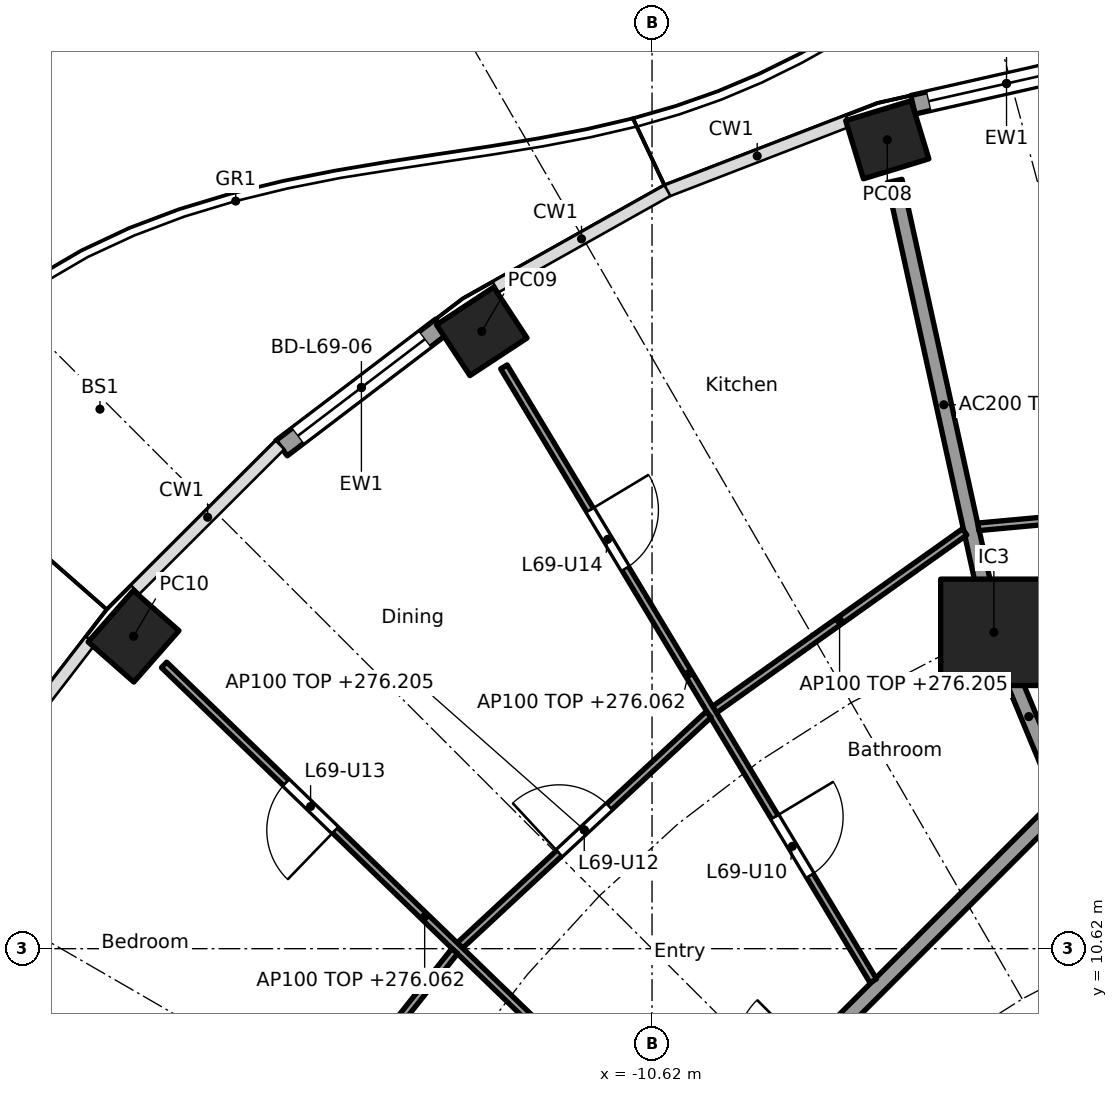
"""IFC4 building model, lengths in metres.
Left out: names, types, materials, properties, quantities, classifications, styles, units other than length and angle.
Written with IfcOpenShell. Run it as: python <this file> out.ifc"""

import sys

from ifc_helpers import new_model, si_unit, direction, frame, frame_2d, origin, origin_2d, place, context, subcontext, project, spatial, rectangle, hollow_rectangle, extrude, element, fill, save


model = new_model("IFC4")
c1 = context("Model", 3, precision=1e-05, world=origin(), true_north=direction((0.0, 1.0)))
c2 = subcontext(c1, "Body", "Model", "MODEL_VIEW")
j1 = project(units=[si_unit("LENGTHUNIT", "METRE"), si_unit("PLANEANGLEUNIT", "RADIAN")], contexts=[c1])
p1 = place(None, origin())
s1 = spatial("IfcSite", under=j1, at=p1, CompositionType="ELEMENT")
p2 = place(p1, origin())
s2 = spatial("IfcBuilding", under=s1, at=p2, CompositionType="ELEMENT")
p3 = place(p2, frame((0.0, 0.0, 273.3)))
s3 = spatial("IfcBuildingStorey", under=s2, at=p3, CompositionType="ELEMENT", Elevation=273.3)
for number, where, z_axis, x_axis in (
    (1, (-7.525, 21.262, 0.0), (0.0, 0.0, 1.0), (-0.957, -0.292, 0.0)),
    (2, (-12.86, 18.741, 0.0), (0.0, 0.0, 1.0), (-0.836, -0.549, 0.0)),
    (3, (-17.441, 14.73, 0.0), (0.0, 0.0, 1.0), (-0.66, -0.751, 0.0)),
):
    element("IfcColumn", number, at=place(p3, frame(where, z_axis=z_axis, x_axis=x_axis)), inside=s3, PredefinedType="COLUMN", context=c2, shape_type="SweptSolid", body=[
        extrude(hollow_rectangle(XDim=0.9, YDim=0.8, WallThickness=0.028, at=origin_2d()), origin(), (0.0, 0.0, 1.0), 3.7),
    ])
p4 = place(p3, frame((-6.123, 14.782, 0.0), z_axis=(0.0, 0.0, 1.0), x_axis=(1.0, 0.0, 0.0)))
e4 = element("IfcColumn", 4, at=p4, inside=s3, PredefinedType="COLUMN", context=c2, shape_type="SweptSolid", body=[
    extrude(rectangle(XDim=1.4, YDim=1.4, at=origin_2d()), origin(), (0.0, 0.0, 1.0), 3.7),
])
p5 = place(p3, frame((-7.188, 21.723, 0.0), z_axis=(0.0, 0.0, 1.0), x_axis=(0.975319584032, 0.220797891756, 0.0)))
e5 = element("IfcWall", 5, at=p5, inside=s3, PredefinedType="SOLIDWALL", context=c2, shape_type="SweptSolid", body=[
    extrude(rectangle(XDim=2.525, YDim=0.25, at=frame_2d((1.263, 0.0))), origin(), (0.0, 0.0, 1.0), 3.44),
])
p6 = place(p5, frame((0.213, 0.0, 0.0)))
e6 = element("IfcOpeningElement", 6, at=p6, cuts=e5, PredefinedType="OPENING", context=c2, shape_type="SweptSolid", body=[
    extrude(rectangle(XDim=2.1, YDim=2.4, at=frame_2d((1.05, 1.2))), frame((0.0, 0.135, 0.0), z_axis=(0.0, -1.0, 0.0), x_axis=(1.0, 0.0, 0.0)), (0.0, 0.0, 1.0), 0.27),
])
p7 = place(p3, frame((-15.495, 17.204, 0.0), z_axis=(0.0, 0.0, 1.0), x_axis=(0.796010739377, 0.605282498339, 0.0)))
e7 = element("IfcWall", 7, at=p7, inside=s3, PredefinedType="SOLIDWALL", context=c2, shape_type="SweptSolid", body=[
    extrude(rectangle(XDim=2.641, YDim=0.25, at=frame_2d((1.32, 0.0))), origin(), (0.0, 0.0, 1.0), 3.44),
])
p8 = place(p7, frame((0.27, 0.0, 0.0)))
e8 = element("IfcOpeningElement", 8, at=p8, cuts=e7, PredefinedType="OPENING", context=c2, shape_type="SweptSolid", body=[
    extrude(rectangle(XDim=2.1, YDim=2.4, at=frame_2d((1.05, 1.2))), frame((0.0, 0.135, 0.0), z_axis=(0.0, -1.0, 0.0), x_axis=(1.0, 0.0, 0.0)), (0.0, 0.0, 1.0), 0.27),
])
p9 = place(p3, frame((-4.613, 9.988, 0.0), z_axis=(0.0, 0.0, 1.0), x_axis=(-0.707106781187, -0.707106781187, 0.0)))
e9 = element("IfcWall", 9, at=p9, inside=s3, PredefinedType="SHEAR", context=c2, shape_type="SweptSolid", body=[
    extrude(rectangle(XDim=7.602, YDim=0.6, at=frame_2d((3.801, 0.0))), origin(), (0.0, 0.0, 1.0), 3.44),
])
p10 = place(p9, frame((0.351, 0.0, 0.0)))
e10 = element("IfcOpeningElement", 10, at=p10, cuts=e9, PredefinedType="OPENING", context=c2, shape_type="SweptSolid", body=[
    extrude(rectangle(XDim=1.1, YDim=2.1, at=frame_2d((0.55, 1.05))), frame((0.0, 0.31, 0.0), z_axis=(0.0, -1.0, 0.0), x_axis=(1.0, 0.0, 0.0)), (0.0, 0.0, 1.0), 0.62),
])
p11 = place(p3, frame((-5.243, 12.657, 0.0), z_axis=(0.0, 0.0, 1.0), x_axis=(-0.38273085373, 0.923859888513, 0.0)))
e11 = element("IfcWall", 11, at=p11, inside=s3, PredefinedType="PARTITIONING", context=c2, shape_type="SweptSolid", body=[
    extrude(rectangle(XDim=2.199, YDim=0.2, at=frame_2d((1.1, 0.0))), origin(), (0.0, 0.0, 1.0), 3.44),
])
p12 = place(p3, frame((-6.134, 14.831, 0.0), z_axis=(0.0, 0.0, 1.0), x_axis=(-0.214842475666, 0.976648714047, 0.0)))
e12 = element("IfcWall", 12, at=p12, inside=s3, PredefinedType="PARTITIONING", context=c2, shape_type="SweptSolid", body=[
    extrude(rectangle(XDim=6.031, YDim=0.2, at=frame_2d((3.015, 0.0))), origin(), (0.0, 0.0, 1.0), 2.905),
])
p13 = place(p3, frame((-5.275, 12.494, 0.0), z_axis=(0.0, 0.0, 1.0), x_axis=(-0.707106781187, -0.707106781187, 0.0)))
e13 = element("IfcWall", 13, at=p13, inside=s3, PredefinedType="PARTITIONING", context=c2, shape_type="SweptSolid", body=[
    extrude(rectangle(XDim=10.209, YDim=0.2, at=frame_2d((5.104, 0.0))), origin(), (0.0, 0.0, 1.0), 3.44),
])
p14 = place(p13, frame((4.604, 0.0, 0.0)))
e14 = element("IfcOpeningElement", 14, at=p14, cuts=e13, PredefinedType="OPENING", context=c2, shape_type="SweptSolid", body=[
    extrude(rectangle(XDim=1.0, YDim=2.1, at=frame_2d((0.5, 1.05))), frame((0.0, 0.11, 0.0), z_axis=(0.0, -1.0, 0.0), x_axis=(1.0, 0.0, 0.0)), (0.0, 0.0, 1.0), 0.22),
])
p15 = place(p3, frame((-1.811, 16.583, 0.0), z_axis=(0.0, 0.0, 1.0), x_axis=(-0.995842301034, -0.091093970555, 0.0)))
e15 = element("IfcWall", 15, at=p15, inside=s3, PredefinedType="PARTITIONING", context=c2, shape_type="SweptSolid", body=[
    extrude(rectangle(XDim=4.535, YDim=0.1, at=frame_2d((2.267, 0.0))), origin(), (0.0, 0.0, 1.0), 2.905),
])
p16 = place(p3, frame((-6.508, 16.103, 0.0), z_axis=(0.0, 0.0, 1.0), x_axis=(-0.815202203556, -0.579176456114, 0.0)))
e16 = element("IfcWall", 16, at=p16, inside=s3, PredefinedType="PARTITIONING", context=c2, shape_type="SweptSolid", body=[
    extrude(rectangle(XDim=4.036, YDim=0.1, at=frame_2d((2.018, 0.0))), origin(), (0.0, 0.0, 1.0), 2.905),
])
p17 = place(p3, frame((-7.709, 10.197, 0.0), z_axis=(0.0, 0.0, 1.0), x_axis=(-0.515516160663, 0.856879856278, 0.0)))
e17 = element("IfcWall", 17, at=p17, inside=s3, PredefinedType="PARTITIONING", context=c2, shape_type="SweptSolid", body=[
    extrude(rectangle(XDim=9.426, YDim=0.1, at=frame_2d((4.713, 0.0))), origin(), (0.0, 0.0, 1.0), 2.762),
])
p18 = place(p17, frame((1.615, 0.0, 0.0)))
e18 = element("IfcOpeningElement", 18, at=p18, cuts=e17, PredefinedType="OPENING", context=c2, shape_type="SweptSolid", body=[
    extrude(rectangle(XDim=0.9, YDim=2.1, at=frame_2d((0.45, 1.05))), frame((0.0, 0.06, 0.0), z_axis=(0.0, -1.0, 0.0), x_axis=(1.0, 0.0, 0.0)), (0.0, 0.0, 1.0), 0.12),
])
p19 = place(p17, frame((6.328, 0.0, 0.0)))
e19 = element("IfcOpeningElement", 19, at=p19, cuts=e17, PredefinedType="OPENING", context=c2, shape_type="SweptSolid", body=[
    extrude(rectangle(XDim=0.9, YDim=2.1, at=frame_2d((0.45, 1.05))), frame((0.0, 0.06, 0.0), z_axis=(0.0, -1.0, 0.0), x_axis=(1.0, 0.0, 0.0)), (0.0, 0.0, 1.0), 0.12),
])
p20 = place(p3, frame((-9.875, 13.702, 0.0), z_axis=(0.0, 0.0, 1.0), x_axis=(-0.732618266441, -0.680639754699, 0.0)))
e20 = element("IfcWall", 20, at=p20, inside=s3, PredefinedType="PARTITIONING", context=c2, shape_type="SweptSolid", body=[
    extrude(rectangle(XDim=4.467, YDim=0.1, at=frame_2d((2.233, 0.0))), origin(), (0.0, 0.0, 1.0), 2.905),
])
p21 = place(p20, frame((1.783, 0.0, 0.0)))
e21 = element("IfcOpeningElement", 21, at=p21, cuts=e20, PredefinedType="OPENING", context=c2, shape_type="SweptSolid", body=[
    extrude(rectangle(XDim=0.9, YDim=2.1, at=frame_2d((0.45, 1.05))), frame((0.0, 0.06, 0.0), z_axis=(0.0, -1.0, 0.0), x_axis=(1.0, 0.0, 0.0)), (0.0, 0.0, 1.0), 0.12),
])
p22 = place(p3, frame((-10.183, 7.727, 0.0), z_axis=(0.0, 0.0, 1.0), x_axis=(-0.719063433856, 0.694944442449, 0.0)))
e22 = element("IfcWall", 22, at=p22, inside=s3, PredefinedType="PARTITIONING", context=c2, shape_type="SweptSolid", body=[
    extrude(rectangle(XDim=9.535, YDim=0.1, at=frame_2d((4.768, 0.0))), origin(), (0.0, 0.0, 1.0), 2.762),
])
p23 = place(p22, frame((1.637, 0.0, 0.0)))
e23 = element("IfcOpeningElement", 23, at=p23, cuts=e22, PredefinedType="OPENING", context=c2, shape_type="SweptSolid", body=[
    extrude(rectangle(XDim=0.9, YDim=2.1, at=frame_2d((0.45, 1.05))), frame((0.0, 0.06, 0.0), z_axis=(0.0, -1.0, 0.0), x_axis=(1.0, 0.0, 0.0)), (0.0, 0.0, 1.0), 0.12),
])
p24 = place(p22, frame((6.405, 0.0, 0.0)))
e24 = element("IfcOpeningElement", 24, at=p24, cuts=e22, PredefinedType="OPENING", context=c2, shape_type="SweptSolid", body=[
    extrude(rectangle(XDim=0.9, YDim=2.1, at=frame_2d((0.45, 1.05))), frame((0.0, 0.06, 0.0), z_axis=(0.0, -1.0, 0.0), x_axis=(1.0, 0.0, 0.0)), (0.0, 0.0, 1.0), 0.12),
])
p25 = place(p3, frame((-13.216, 10.589, 0.0), z_axis=(0.0, 0.0, 1.0), x_axis=(-0.622251572882, -0.782817335045, 0.0)))
e25 = element("IfcWall", 25, at=p25, inside=s3, PredefinedType="PARTITIONING", context=c2, shape_type="SweptSolid", body=[
    extrude(rectangle(XDim=4.636, YDim=0.1, at=frame_2d((2.318, 0.0))), origin(), (0.0, 0.0, 1.0), 2.905),
])
p26 = place(p6, origin())
e26 = element("IfcDoor", 26, at=p26, inside=s3, OperationType="SLIDING_TO_LEFT", PredefinedType="DOOR", context=c2, shape_type="SweptSolid", body=[
    extrude(rectangle(XDim=2.1, YDim=2.4, at=frame_2d((1.05, 1.2))), frame((0.0, 0.025, 0.0), z_axis=(0.0, -1.0, 0.0), x_axis=(1.0, 0.0, 0.0)), (0.0, 0.0, 1.0), 0.05),
])
fill(e6, e26)
p27 = place(p8, origin())
e27 = element("IfcDoor", 27, at=p27, inside=s3, OperationType="SLIDING_TO_LEFT", PredefinedType="DOOR", context=c2, shape_type="SweptSolid", body=[
    extrude(rectangle(XDim=2.1, YDim=2.4, at=frame_2d((1.05, 1.2))), frame((0.0, 0.025, 0.0), z_axis=(0.0, -1.0, 0.0), x_axis=(1.0, 0.0, 0.0)), (0.0, 0.0, 1.0), 0.05),
])
fill(e8, e27)
p28 = place(p18, frame((0.9, 0.0, 0.0), x_axis=(-1.0, 0.0, 0.0)))
e28 = element("IfcDoor", 28, at=p28, inside=s3, OperationType="SINGLE_SWING_LEFT", PredefinedType="DOOR", context=c2, shape_type="SweptSolid", body=[
    extrude(rectangle(XDim=0.9, YDim=2.1, at=frame_2d((0.45, 1.05))), frame((0.0, 0.025, 0.0), z_axis=(0.0, -1.0, 0.0), x_axis=(1.0, 0.0, 0.0)), (0.0, 0.0, 1.0), 0.05),
])
fill(e18, e28)
p29 = place(p21, frame((0.9, 0.0, 0.0), x_axis=(-1.0, 0.0, 0.0)))
e29 = element("IfcDoor", 29, at=p29, inside=s3, OperationType="SINGLE_SWING_LEFT", PredefinedType="DOOR", context=c2, shape_type="SweptSolid", body=[
    extrude(rectangle(XDim=0.9, YDim=2.1, at=frame_2d((0.45, 1.05))), frame((0.0, 0.025, 0.0), z_axis=(0.0, -1.0, 0.0), x_axis=(1.0, 0.0, 0.0)), (0.0, 0.0, 1.0), 0.05),
])
fill(e21, e29)
p30 = place(p24, origin())
e30 = element("IfcDoor", 30, at=p30, inside=s3, OperationType="SINGLE_SWING_LEFT", PredefinedType="DOOR", context=c2, shape_type="SweptSolid", body=[
    extrude(rectangle(XDim=0.9, YDim=2.1, at=frame_2d((0.45, 1.05))), frame((0.0, 0.025, 0.0), z_axis=(0.0, -1.0, 0.0), x_axis=(1.0, 0.0, 0.0)), (0.0, 0.0, 1.0), 0.05),
])
fill(e24, e30)
p31 = place(p19, frame((0.9, 0.0, 0.0), x_axis=(-1.0, 0.0, 0.0)))
e31 = element("IfcDoor", 31, at=p31, inside=s3, OperationType="SINGLE_SWING_LEFT", PredefinedType="DOOR", context=c2, shape_type="SweptSolid", body=[
    extrude(rectangle(XDim=0.9, YDim=2.1, at=frame_2d((0.45, 1.05))), frame((0.0, 0.025, 0.0), z_axis=(0.0, -1.0, 0.0), x_axis=(1.0, 0.0, 0.0)), (0.0, 0.0, 1.0), 0.05),
])
fill(e19, e31)
save(model, sys.argv[1])
